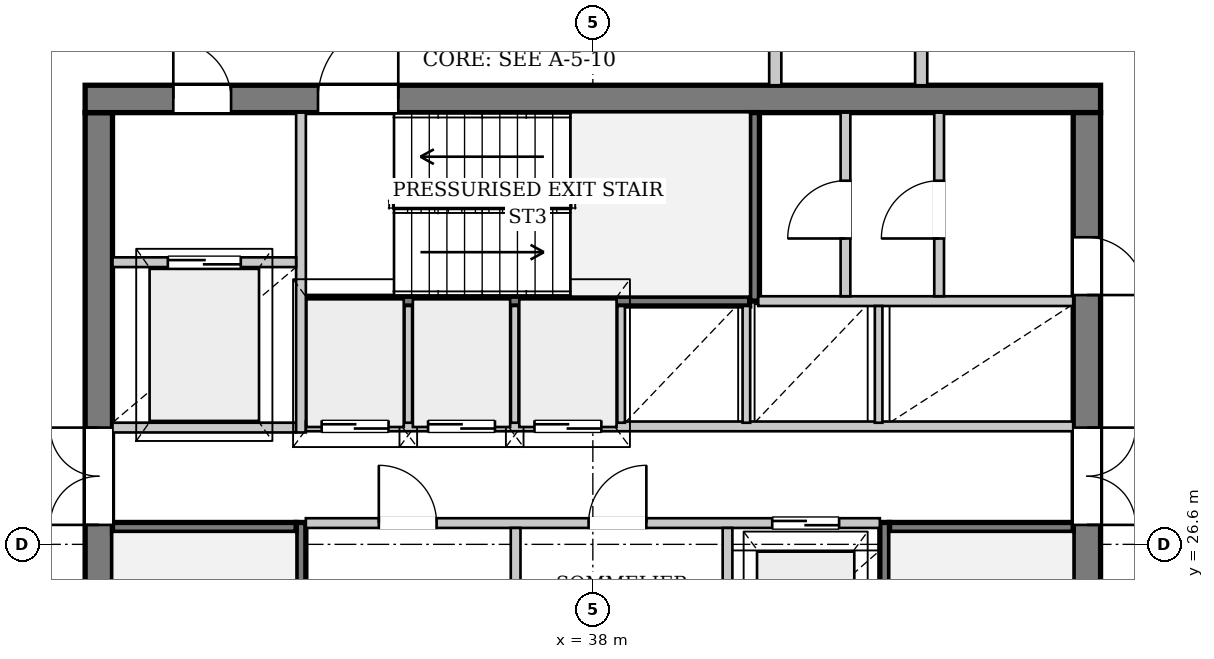
"""IFC4 building model, lengths in metres.
Left out: names, types, materials, properties, quantities, classifications, styles, units other than length and angle.
Written with IfcOpenShell. Run it as: python <this file> out.ifc"""

import sys

from ifc_helpers import new_model, si_unit, direction, frame, frame_2d, origin, place, context, subcontext, project, spatial, rectangle, extrude, source, transform, mapped, element, fill, save


model = new_model("IFC4")
c1 = context("Model", 3, precision=1e-05, world=origin(), true_north=direction((0.0, 1.0)))
c2 = subcontext(c1, "Body", "Model", "MODEL_VIEW")
j1 = project(units=[si_unit("LENGTHUNIT", "METRE"), si_unit("PLANEANGLEUNIT", "RADIAN")], contexts=[c1])
p1 = place(None, origin())
s1 = spatial("IfcSite", under=j1, at=p1, CompositionType="ELEMENT")
p2 = place(p1, origin())
s2 = spatial("IfcBuilding", under=s1, at=p2, CompositionType="ELEMENT")
p3 = place(p2, frame((0.0, 0.0, 266.9)))
s3 = spatial("IfcBuildingStorey", under=s2, at=p3, CompositionType="ELEMENT", Elevation=266.9)
p4 = place(p3, frame((51.43, 27.055, 0.0), z_axis=(0.0, 0.0, 1.0), x_axis=(-0.235712431361, -0.97182284893, 0.0)))
e1 = element("IfcWall", 1, at=p4, inside=s3, PredefinedType="SOLIDWALL", context=c2, shape_type="SweptSolid", body=[
    extrude(rectangle(XDim=22.254, YDim=0.32, at=frame_2d((11.127, 0.0))), origin(), (0.0, 0.0, 1.0), 2.872),
])
p5 = place(p4, frame((6.371, 0.0, 0.0)))
e2 = element("IfcOpeningElement", 2, at=p5, cuts=e1, PredefinedType="OPENING", context=c2, shape_type="SweptSolid", body=[
    extrude(rectangle(XDim=1.5, YDim=2.3, at=frame_2d((0.75, 1.15))), frame((0.0, 0.17, 0.0), z_axis=(0.0, -1.0, 0.0), x_axis=(1.0, 0.0, 0.0)), (0.0, 0.0, 1.0), 0.34),
])
p6 = place(p4, frame((15.168, 0.0, 0.402)))
e3 = element("IfcOpeningElement", 3, at=p6, cuts=e1, PredefinedType="OPENING", context=c2, shape_type="SweptSolid", body=[
    extrude(rectangle(XDim=2.6, YDim=2.35, at=frame_2d((1.3, 1.175))), frame((0.0, 0.17, 0.0), z_axis=(0.0, -1.0, 0.0), x_axis=(1.0, 0.0, 0.0)), (0.0, 0.0, 1.0), 0.34),
])
p7 = place(p3, frame((15.976, 26.276, 0.0), z_axis=(0.0, 0.0, 1.0), x_axis=(0.794029694054, 0.607878972297, 0.0)))
e4 = element("IfcWall", 4, at=p7, inside=s3, PredefinedType="SOLIDWALL", context=c2, shape_type="SweptSolid", body=[
    extrude(rectangle(XDim=21.739, YDim=0.38, at=frame_2d((10.869, 0.0))), origin(), (0.0, 0.0, 1.0), 2.872),
])
p8 = place(p7, frame((7.187, 0.0, 0.502)))
e5 = element("IfcOpeningElement", 5, at=p8, cuts=e4, PredefinedType="OPENING", context=c2, shape_type="SweptSolid", body=[
    extrude(rectangle(XDim=2.2, YDim=2.25, at=frame_2d((1.1, 1.125))), frame((0.0, 0.2, 0.0), z_axis=(0.0, -1.0, 0.0), x_axis=(1.0, 0.0, 0.0)), (0.0, 0.0, 1.0), 0.4),
])
p9 = place(p7, frame((16.752, 0.0, 0.502)))
e6 = element("IfcOpeningElement", 6, at=p9, cuts=e4, PredefinedType="OPENING", context=c2, shape_type="SweptSolid", body=[
    extrude(rectangle(XDim=2.2, YDim=2.25, at=frame_2d((1.1, 1.125))), frame((0.0, 0.2, 0.0), z_axis=(0.0, -1.0, 0.0), x_axis=(1.0, 0.0, 0.0)), (0.0, 0.0, 1.0), 0.4),
])
p10 = place(p3, frame((29.875, 19.5, 0.0), z_axis=(0.0, 0.0, 1.0), x_axis=(0.0, 1.0, 0.0)))
e7 = element("IfcWall", 7, at=p10, inside=s3, PredefinedType="SHEAR", context=c2, shape_type="SweptSolid", body=[
    extrude(rectangle(XDim=14.2, YDim=0.45, at=frame_2d((7.1, 0.0))), origin(), (0.0, 0.0, 1.0), 3.38),
])
p11 = place(p10, frame((7.42, 0.0, 0.0)))
e8 = element("IfcOpeningElement", 8, at=p11, cuts=e7, PredefinedType="OPENING", context=c2, shape_type="SweptSolid", body=[
    extrude(rectangle(XDim=1.6, YDim=2.2, at=frame_2d((0.8, 1.1))), frame((0.0, 0.235, 0.0), z_axis=(0.0, -1.0, 0.0), x_axis=(1.0, 0.0, 0.0)), (0.0, 0.0, 1.0), 0.47),
])
p12 = place(p3, frame((29.65, 33.925, 0.0), z_axis=(0.0, 0.0, 1.0), x_axis=(1.0, 0.0, 0.0)))
e9 = element("IfcWall", 9, at=p12, inside=s3, PredefinedType="SHEAR", context=c2, shape_type="SweptSolid", body=[
    extrude(rectangle(XDim=16.7, YDim=0.45, at=frame_2d((8.35, 0.0))), origin(), (0.0, 0.0, 1.0), 3.38),
])
p13 = place(p12, frame((1.45, 0.0, 0.0)))
e10 = element("IfcOpeningElement", 10, at=p13, cuts=e9, PredefinedType="OPENING", context=c2, shape_type="SweptSolid", body=[
    extrude(rectangle(XDim=0.95, YDim=2.1, at=frame_2d((0.475, 1.05))), frame((0.0, 0.235, 0.0), z_axis=(0.0, -1.0, 0.0), x_axis=(1.0, 0.0, 0.0)), (0.0, 0.0, 1.0), 0.47),
])
p14 = place(p12, frame((3.83, 0.0, 0.0)))
e11 = element("IfcOpeningElement", 11, at=p14, cuts=e9, PredefinedType="OPENING", context=c2, shape_type="SweptSolid", body=[
    extrude(rectangle(XDim=1.32, YDim=2.2, at=frame_2d((0.66, 1.1))), frame((0.0, 0.235, 0.0), z_axis=(0.0, -1.0, 0.0), x_axis=(1.0, 0.0, 0.0)), (0.0, 0.0, 1.0), 0.47),
])
p15 = place(p3, frame((46.125, 33.7, 0.0), z_axis=(0.0, 0.0, 1.0), x_axis=(0.0, -1.0, 0.0)))
e12 = element("IfcWall", 12, at=p15, inside=s3, PredefinedType="SHEAR", context=c2, shape_type="SweptSolid", body=[
    extrude(rectangle(XDim=14.2, YDim=0.45, at=frame_2d((7.1, 0.0))), origin(), (0.0, 0.0, 1.0), 3.38),
])
p16 = place(p15, frame((5.18, 0.0, 0.0)))
e13 = element("IfcOpeningElement", 13, at=p16, cuts=e12, PredefinedType="OPENING", context=c2, shape_type="SweptSolid", body=[
    extrude(rectangle(XDim=1.6, YDim=2.2, at=frame_2d((0.8, 1.1))), frame((0.0, 0.235, 0.0), z_axis=(0.0, -1.0, 0.0), x_axis=(1.0, 0.0, 0.0)), (0.0, 0.0, 1.0), 0.47),
])
p17 = place(p15, frame((2.05, 0.0, 0.0)))
e14 = element("IfcOpeningElement", 14, at=p17, cuts=e12, PredefinedType="OPENING", context=c2, shape_type="SweptSolid", body=[
    extrude(rectangle(XDim=0.95, YDim=2.1, at=frame_2d((0.475, 1.05))), frame((0.0, 0.235, 0.0), z_axis=(0.0, -1.0, 0.0), x_axis=(1.0, 0.0, 0.0)), (0.0, 0.0, 1.0), 0.47),
])
p18 = place(p3, frame((33.2, 19.5, 0.0), z_axis=(0.0, 0.0, 1.0), x_axis=(0.0, 1.0, 0.0)))
e15 = element("IfcWall", 15, at=p18, inside=s3, PredefinedType="PARTITIONING", context=c2, shape_type="SweptSolid", body=[
    extrude(rectangle(XDim=7.46, YDim=0.16, at=frame_2d((3.73, 0.0))), origin(), (0.0, 0.0, 1.0), 3.38),
])
p19 = place(p18, frame((0.08, 0.0, 0.0)))
e16 = element("IfcOpeningElement", 16, at=p19, cuts=e15, PredefinedType="OPENING", context=c2, shape_type="SweptSolid", body=[
    extrude(rectangle(XDim=1.32, YDim=2.2, at=frame_2d((0.66, 1.1))), frame((0.0, 0.09, 0.0), z_axis=(0.0, -1.0, 0.0), x_axis=(1.0, 0.0, 0.0)), (0.0, 0.0, 1.0), 0.18),
])
p20 = place(p3, frame((30.1, 26.88, 0.0), z_axis=(0.0, 0.0, 1.0), x_axis=(1.0, 0.0, 0.0)))
e17 = element("IfcWall", 17, at=p20, inside=s3, PredefinedType="PARTITIONING", context=c2, shape_type="SweptSolid", body=[
    extrude(rectangle(XDim=3.02, YDim=0.16, at=frame_2d((1.51, 0.0))), origin(), (0.0, 0.0, 1.0), 3.38),
])
p21 = place(p3, frame((42.8, 26.96, 0.0), z_axis=(0.0, 0.0, 1.0), x_axis=(0.0, -1.0, 0.0)))
e18 = element("IfcWall", 18, at=p21, inside=s3, PredefinedType="PARTITIONING", context=c2, shape_type="SweptSolid", body=[
    extrude(rectangle(XDim=7.46, YDim=0.16, at=frame_2d((3.73, 0.0))), origin(), (0.0, 0.0, 1.0), 3.38),
])
p22 = place(p21, frame((6.06, 0.0, 0.0)))
e19 = element("IfcOpeningElement", 19, at=p22, cuts=e18, PredefinedType="OPENING", context=c2, shape_type="SweptSolid", body=[
    extrude(rectangle(XDim=1.32, YDim=2.2, at=frame_2d((0.66, 1.1))), frame((0.0, 0.09, 0.0), z_axis=(0.0, -1.0, 0.0), x_axis=(1.0, 0.0, 0.0)), (0.0, 0.0, 1.0), 0.18),
])
p23 = place(p3, frame((42.88, 26.88, 0.0), z_axis=(0.0, 0.0, 1.0), x_axis=(1.0, 0.0, 0.0)))
e20 = element("IfcWall", 20, at=p23, inside=s3, PredefinedType="PARTITIONING", context=c2, shape_type="SweptSolid", body=[
    extrude(rectangle(XDim=3.02, YDim=0.16, at=frame_2d((1.51, 0.0))), origin(), (0.0, 0.0, 1.0), 3.38),
])
p24 = place(p3, frame((33.28, 30.6, 0.0), z_axis=(0.0, 0.0, 1.0), x_axis=(1.0, 0.0, 0.0)))
e21 = element("IfcWall", 21, at=p24, inside=s3, PredefinedType="PARTITIONING", context=c2, shape_type="SweptSolid", body=[
    extrude(rectangle(XDim=7.3, YDim=0.16, at=frame_2d((3.65, 0.0))), origin(), (0.0, 0.0, 1.0), 3.38),
])
p25 = place(p3, frame((40.66, 30.6, 0.0), z_axis=(0.0, 0.0, 1.0), x_axis=(0.0, 1.0, 0.0)))
e22 = element("IfcWall", 22, at=p25, inside=s3, PredefinedType="PARTITIONING", context=c2, shape_type="SweptSolid", body=[
    extrude(rectangle(XDim=3.1, YDim=0.16, at=frame_2d((1.55, 0.0))), origin(), (0.0, 0.0, 1.0), 3.38),
])
p26 = place(p3, frame((30.1, 28.52, 0.0), z_axis=(0.0, 0.0, 1.0), x_axis=(1.0, 0.0, 0.0)))
e23 = element("IfcWall", 23, at=p26, inside=s3, PredefinedType="PARTITIONING", context=c2, shape_type="SweptSolid", body=[
    extrude(rectangle(XDim=3.02, YDim=0.16, at=frame_2d((1.51, 0.0))), origin(), (0.0, 0.0, 1.0), 3.38),
])
p27 = place(p3, frame((33.2, 28.44, 0.0), z_axis=(0.0, 0.0, 1.0), x_axis=(0.0, 1.0, 0.0)))
e24 = element("IfcWall", 24, at=p27, inside=s3, PredefinedType="PARTITIONING", context=c2, shape_type="SweptSolid", body=[
    extrude(rectangle(XDim=5.26, YDim=0.16, at=frame_2d((2.63, 0.0))), origin(), (0.0, 0.0, 1.0), 3.38),
])
p28 = place(p3, frame((30.1, 31.24, 0.0), z_axis=(0.0, 0.0, 1.0), x_axis=(1.0, 0.0, 0.0)))
e25 = element("IfcWall", 25, at=p28, inside=s3, PredefinedType="PARTITIONING", context=c2, shape_type="SweptSolid", body=[
    extrude(rectangle(XDim=3.02, YDim=0.16, at=frame_2d((1.51, 0.0))), origin(), (0.0, 0.0, 1.0), 3.38),
])
p29 = place(p28, frame((0.91, 0.0, 0.0)))
e26 = element("IfcOpeningElement", 26, at=p29, cuts=e25, PredefinedType="OPENING", context=c2, shape_type="SweptSolid", body=[
    extrude(rectangle(XDim=1.2, YDim=2.2, at=frame_2d((0.6, 1.1))), frame((0.0, 0.09, 0.0), z_axis=(0.0, -1.0, 0.0), x_axis=(1.0, 0.0, 0.0)), (0.0, 0.0, 1.0), 0.18),
])
p30 = place(p3, frame((33.28, 26.95, 0.0), z_axis=(0.0, 0.0, 1.0), x_axis=(1.0, 0.0, 0.0)))
e27 = element("IfcWall", 27, at=p30, inside=s3, PredefinedType="PARTITIONING", context=c2, shape_type="SweptSolid", body=[
    extrude(rectangle(XDim=9.44, YDim=0.16, at=frame_2d((4.72, 0.0))), origin(), (0.0, 0.0, 1.0), 3.38),
])
p31 = place(p30, frame((1.2, 0.0, 0.0)))
e28 = element("IfcOpeningElement", 28, at=p31, cuts=e27, PredefinedType="OPENING", context=c2, shape_type="SweptSolid", body=[
    extrude(rectangle(XDim=0.95, YDim=2.1, at=frame_2d((0.475, 1.05))), frame((0.0, 0.09, 0.0), z_axis=(0.0, -1.0, 0.0), x_axis=(1.0, 0.0, 0.0)), (0.0, 0.0, 1.0), 0.18),
])
p32 = place(p30, frame((4.65, 0.0, 0.0)))
e29 = element("IfcOpeningElement", 29, at=p32, cuts=e27, PredefinedType="OPENING", context=c2, shape_type="SweptSolid", body=[
    extrude(rectangle(XDim=0.95, YDim=2.1, at=frame_2d((0.475, 1.05))), frame((0.0, 0.09, 0.0), z_axis=(0.0, -1.0, 0.0), x_axis=(1.0, 0.0, 0.0)), (0.0, 0.0, 1.0), 0.18),
])
p33 = place(p30, frame((7.67, 0.0, 0.0)))
e30 = element("IfcOpeningElement", 30, at=p33, cuts=e27, PredefinedType="OPENING", context=c2, shape_type="SweptSolid", body=[
    extrude(rectangle(XDim=1.1, YDim=2.2, at=frame_2d((0.55, 1.1))), frame((0.0, 0.09, 0.0), z_axis=(0.0, -1.0, 0.0), x_axis=(1.0, 0.0, 0.0)), (0.0, 0.0, 1.0), 0.18),
])
for number, where, z_axis, x_axis in (
    (31, (36.73, 24.56, 0.0), (0.0, 0.0, 1.0), (0.0, 1.0, 0.0)),
    (32, (40.215, 24.56, 0.0), (0.0, 0.0, 1.0), (0.0, 1.0, 0.0)),
):
    element("IfcWall", number, at=place(p3, frame(where, z_axis=z_axis, x_axis=x_axis)), inside=s3, PredefinedType="PARTITIONING", context=c2, shape_type="SweptSolid", body=[
        extrude(rectangle(XDim=2.31, YDim=0.16, at=frame_2d((1.155, 0.0))), origin(), (0.0, 0.0, 1.0), 3.38),
    ])
p34 = place(p3, frame((33.28, 28.54, 0.0), z_axis=(0.0, 0.0, 1.0), x_axis=(1.0, 0.0, 0.0)))
e33 = element("IfcWall", 33, at=p34, inside=s3, PredefinedType="PARTITIONING", context=c2, shape_type="SweptSolid", body=[
    extrude(rectangle(XDim=12.62, YDim=0.16, at=frame_2d((6.31, 0.0))), origin(), (0.0, 0.0, 1.0), 3.38),
])
p35 = place(p34, frame((0.26, 0.0, 0.0)))
e34 = element("IfcOpeningElement", 34, at=p35, cuts=e33, PredefinedType="OPENING", context=c2, shape_type="SweptSolid", body=[
    extrude(rectangle(XDim=1.1, YDim=2.2, at=frame_2d((0.55, 1.1))), frame((0.0, 0.09, 0.0), z_axis=(0.0, -1.0, 0.0), x_axis=(1.0, 0.0, 0.0)), (0.0, 0.0, 1.0), 0.18),
])
p36 = place(p34, frame((2.01, 0.0, 0.0)))
e35 = element("IfcOpeningElement", 35, at=p36, cuts=e33, PredefinedType="OPENING", context=c2, shape_type="SweptSolid", body=[
    extrude(rectangle(XDim=1.1, YDim=2.2, at=frame_2d((0.55, 1.1))), frame((0.0, 0.09, 0.0), z_axis=(0.0, -1.0, 0.0), x_axis=(1.0, 0.0, 0.0)), (0.0, 0.0, 1.0), 0.18),
])
p37 = place(p34, frame((3.76, 0.0, 0.0)))
e36 = element("IfcOpeningElement", 36, at=p37, cuts=e33, PredefinedType="OPENING", context=c2, shape_type="SweptSolid", body=[
    extrude(rectangle(XDim=1.1, YDim=2.2, at=frame_2d((0.55, 1.1))), frame((0.0, 0.09, 0.0), z_axis=(0.0, -1.0, 0.0), x_axis=(1.0, 0.0, 0.0)), (0.0, 0.0, 1.0), 0.18),
])
p38 = place(p3, frame((40.72, 30.6, 0.0), z_axis=(0.0, 0.0, 1.0), x_axis=(1.0, 0.0, 0.0)))
e37 = element("IfcWall", 37, at=p38, inside=s3, PredefinedType="PARTITIONING", context=c2, shape_type="SweptSolid", body=[
    extrude(rectangle(XDim=5.18, YDim=0.16, at=frame_2d((2.59, 0.0))), origin(), (0.0, 0.0, 1.0), 3.38),
])
for number, where, z_axis, x_axis in (
    (38, (34.965, 28.6, 0.0), (0.0, 0.0, 1.0), (0.0, 1.0, 0.0)),
    (39, (36.715, 28.6, 0.0), (0.0, 0.0, 1.0), (0.0, 1.0, 0.0)),
    (40, (38.465, 28.6, 0.0), (0.0, 0.0, 1.0), (0.0, 1.0, 0.0)),
    (41, (40.525, 28.6, 0.0), (0.0, 0.0, 1.0), (0.0, 1.0, 0.0)),
    (42, (42.7, 28.6, 0.0), (0.0, 0.0, 1.0), (0.0, 1.0, 0.0)),
):
    element("IfcWall", number, at=place(p3, frame(where, z_axis=z_axis, x_axis=x_axis)), inside=s3, PredefinedType="PARTITIONING", context=c2, shape_type="SweptSolid", body=[
        extrude(rectangle(XDim=1.92, YDim=0.125, at=frame_2d((0.96, 0.0))), origin(), (0.0, 0.0, 1.0), 3.38),
    ])
p39 = place(p3, frame((42.155, 30.68, 0.0), z_axis=(0.0, 0.0, 1.0), x_axis=(0.0, 1.0, 0.0)))
e43 = element("IfcWall", 43, at=p39, inside=s3, PredefinedType="PARTITIONING", context=c2, shape_type="SweptSolid", body=[
    extrude(rectangle(XDim=3.02, YDim=0.16, at=frame_2d((1.51, 0.0))), origin(), (0.0, 0.0, 1.0), 3.38),
])
p40 = place(p39, frame((0.95, 0.0, 0.0)))
e44 = element("IfcOpeningElement", 44, at=p40, cuts=e43, PredefinedType="OPENING", context=c2, shape_type="SweptSolid", body=[
    extrude(rectangle(XDim=0.95, YDim=2.1, at=frame_2d((0.475, 1.05))), frame((0.0, 0.09, 0.0), z_axis=(0.0, -1.0, 0.0), x_axis=(1.0, 0.0, 0.0)), (0.0, 0.0, 1.0), 0.18),
])
p41 = place(p3, frame((43.695, 30.68, 0.0), z_axis=(0.0, 0.0, 1.0), x_axis=(0.0, 1.0, 0.0)))
e45 = element("IfcWall", 45, at=p41, inside=s3, PredefinedType="PARTITIONING", context=c2, shape_type="SweptSolid", body=[
    extrude(rectangle(XDim=3.02, YDim=0.16, at=frame_2d((1.51, 0.0))), origin(), (0.0, 0.0, 1.0), 3.38),
])
p42 = place(p41, frame((0.95, 0.0, 0.0)))
e46 = element("IfcOpeningElement", 46, at=p42, cuts=e45, PredefinedType="OPENING", context=c2, shape_type="SweptSolid", body=[
    extrude(rectangle(XDim=0.95, YDim=2.1, at=frame_2d((0.475, 1.05))), frame((0.0, 0.09, 0.0), z_axis=(0.0, -1.0, 0.0), x_axis=(1.0, 0.0, 0.0)), (0.0, 0.0, 1.0), 0.18),
])
p43 = place(p3, frame((41.0, 34.15, 0.0), z_axis=(0.0, 0.0, 1.0), x_axis=(0.0, 1.0, 0.0)))
e47 = element("IfcWall", 47, at=p43, inside=s3, PredefinedType="PARTITIONING", context=c2, shape_type="SweptSolid", body=[
    extrude(rectangle(XDim=1.85, YDim=0.2, at=frame_2d((0.925, 0.0))), origin(), (0.0, 0.0, 1.0), 3.38),
])
p44 = place(p3, frame((43.4, 34.15, 0.0), z_axis=(0.0, 0.0, 1.0), x_axis=(0.0, 1.0, 0.0)))
e48 = element("IfcWall", 48, at=p44, inside=s3, PredefinedType="PARTITIONING", context=c2, shape_type="SweptSolid", body=[
    extrude(rectangle(XDim=1.85, YDim=0.2, at=frame_2d((0.925, 0.0))), origin(), (0.0, 0.0, 1.0), 3.055),
])
m1 = source(origin(), c2, "Body", "SweptSolid", [
    extrude(rectangle(XDim=1.6, YDim=2.2, at=frame_2d((0.8, 1.1))), frame((0.0, 0.025, 0.0), z_axis=(0.0, -1.0, 0.0), x_axis=(1.0, 0.0, 0.0)), (0.0, 0.0, 1.0), 0.05),
])
p45 = place(p11, origin())
e49 = element("IfcDoor", 49, at=p45, inside=s3, OperationType="DOUBLE_DOOR_SINGLE_SWING", PredefinedType="DOOR", context=c2, shape_type="MappedRepresentation", body=[
    mapped(m1, transform((0.0, 0.0, 0.0), x_axis=(1.0, 0.0, 0.0), y_axis=(0.0, 1.0, 0.0), z_axis=(0.0, 0.0, 1.0), scale=1.0)),
])
fill(e8, e49)
m2 = source(origin(), c2, "Body", "SweptSolid", [
    extrude(rectangle(XDim=0.95, YDim=2.1, at=frame_2d((0.475, 1.05))), frame((0.0, 0.025, 0.0), z_axis=(0.0, -1.0, 0.0), x_axis=(1.0, 0.0, 0.0)), (0.0, 0.0, 1.0), 0.05),
])
p46 = place(p13, origin())
e50 = element("IfcDoor", 50, at=p46, inside=s3, OperationType="SINGLE_SWING_LEFT", PredefinedType="DOOR", context=c2, shape_type="MappedRepresentation", body=[
    mapped(m2, transform((0.0, 0.0, 0.0), x_axis=(1.0, 0.0, 0.0), y_axis=(0.0, 1.0, 0.0), z_axis=(0.0, 0.0, 1.0), scale=1.0)),
])
fill(e10, e50)
m3 = source(origin(), c2, "Body", "SweptSolid", [
    extrude(rectangle(XDim=1.32, YDim=2.2, at=frame_2d((0.66, 1.1))), frame((0.0, 0.025, 0.0), z_axis=(0.0, -1.0, 0.0), x_axis=(1.0, 0.0, 0.0)), (0.0, 0.0, 1.0), 0.05),
])
p47 = place(p14, origin())
e51 = element("IfcDoor", 51, at=p47, inside=s3, OperationType="SINGLE_SWING_RIGHT", PredefinedType="DOOR", context=c2, shape_type="MappedRepresentation", body=[
    mapped(m3, transform((0.0, 0.0, 0.0), x_axis=(1.0, 0.0, 0.0), y_axis=(0.0, 1.0, 0.0), z_axis=(0.0, 0.0, 1.0), scale=1.0)),
])
fill(e11, e51)
p48 = place(p16, origin())
e52 = element("IfcDoor", 52, at=p48, inside=s3, OperationType="DOUBLE_DOOR_SINGLE_SWING", PredefinedType="DOOR", context=c2, shape_type="MappedRepresentation", body=[
    mapped(m1, transform((0.0, 0.0, 0.0), x_axis=(1.0, 0.0, 0.0), y_axis=(0.0, 1.0, 0.0), z_axis=(0.0, 0.0, 1.0), scale=1.0)),
])
fill(e13, e52)
m4 = source(origin(), c2, "Body", "SweptSolid", [
    extrude(rectangle(XDim=1.2, YDim=2.2, at=frame_2d((0.6, 1.1))), frame((0.0, 0.025, 0.0), z_axis=(0.0, -1.0, 0.0), x_axis=(1.0, 0.0, 0.0)), (0.0, 0.0, 1.0), 0.05),
])
p49 = place(p29, origin())
e53 = element("IfcDoor", 53, at=p49, inside=s3, OperationType="DOUBLE_DOOR_SLIDING", PredefinedType="DOOR", context=c2, shape_type="MappedRepresentation", body=[
    mapped(m4, transform((0.0, 0.0, 0.0), x_axis=(1.0, 0.0, 0.0), y_axis=(0.0, 1.0, 0.0), z_axis=(0.0, 0.0, 1.0), scale=1.0)),
])
fill(e26, e53)
p50 = place(p31, origin())
e54 = element("IfcDoor", 54, at=p50, inside=s3, OperationType="SINGLE_SWING_LEFT", PredefinedType="DOOR", context=c2, shape_type="MappedRepresentation", body=[
    mapped(m2, transform((0.0, 0.0, 0.0), x_axis=(1.0, 0.0, 0.0), y_axis=(0.0, 1.0, 0.0), z_axis=(0.0, 0.0, 1.0), scale=1.0)),
])
fill(e28, e54)
p51 = place(p32, origin())
e55 = element("IfcDoor", 55, at=p51, inside=s3, OperationType="SINGLE_SWING_RIGHT", PredefinedType="DOOR", context=c2, shape_type="MappedRepresentation", body=[
    mapped(m2, transform((0.0, 0.0, 0.0), x_axis=(1.0, 0.0, 0.0), y_axis=(0.0, 1.0, 0.0), z_axis=(0.0, 0.0, 1.0), scale=1.0)),
])
fill(e29, e55)
m5 = source(origin(), c2, "Body", "SweptSolid", [
    extrude(rectangle(XDim=1.1, YDim=2.2, at=frame_2d((0.55, 1.1))), frame((0.0, 0.025, 0.0), z_axis=(0.0, -1.0, 0.0), x_axis=(1.0, 0.0, 0.0)), (0.0, 0.0, 1.0), 0.05),
])
p52 = place(p33, origin())
e56 = element("IfcDoor", 56, at=p52, inside=s3, OperationType="DOUBLE_DOOR_SLIDING", PredefinedType="DOOR", context=c2, shape_type="MappedRepresentation", body=[
    mapped(m5, transform((0.0, 0.0, 0.0), x_axis=(1.0, 0.0, 0.0), y_axis=(0.0, 1.0, 0.0), z_axis=(0.0, 0.0, 1.0), scale=1.0)),
])
fill(e30, e56)
p53 = place(p35, origin())
e57 = element("IfcDoor", 57, at=p53, inside=s3, OperationType="DOUBLE_DOOR_SLIDING", PredefinedType="DOOR", context=c2, shape_type="MappedRepresentation", body=[
    mapped(m5, transform((0.0, 0.0, 0.0), x_axis=(1.0, 0.0, 0.0), y_axis=(0.0, 1.0, 0.0), z_axis=(0.0, 0.0, 1.0), scale=1.0)),
])
fill(e34, e57)
p54 = place(p36, origin())
e58 = element("IfcDoor", 58, at=p54, inside=s3, OperationType="DOUBLE_DOOR_SLIDING", PredefinedType="DOOR", context=c2, shape_type="MappedRepresentation", body=[
    mapped(m5, transform((0.0, 0.0, 0.0), x_axis=(1.0, 0.0, 0.0), y_axis=(0.0, 1.0, 0.0), z_axis=(0.0, 0.0, 1.0), scale=1.0)),
])
fill(e35, e58)
p55 = place(p37, origin())
e59 = element("IfcDoor", 59, at=p55, inside=s3, OperationType="DOUBLE_DOOR_SLIDING", PredefinedType="DOOR", context=c2, shape_type="MappedRepresentation", body=[
    mapped(m5, transform((0.0, 0.0, 0.0), x_axis=(1.0, 0.0, 0.0), y_axis=(0.0, 1.0, 0.0), z_axis=(0.0, 0.0, 1.0), scale=1.0)),
])
fill(e36, e59)
p56 = place(p40, origin())
e60 = element("IfcDoor", 60, at=p56, inside=s3, OperationType="SINGLE_SWING_LEFT", PredefinedType="DOOR", context=c2, shape_type="MappedRepresentation", body=[
    mapped(m2, transform((0.0, 0.0, 0.0), x_axis=(1.0, 0.0, 0.0), y_axis=(0.0, 1.0, 0.0), z_axis=(0.0, 0.0, 1.0), scale=1.0)),
])
fill(e44, e60)
p57 = place(p42, origin())
e61 = element("IfcDoor", 61, at=p57, inside=s3, OperationType="SINGLE_SWING_LEFT", PredefinedType="DOOR", context=c2, shape_type="MappedRepresentation", body=[
    mapped(m2, transform((0.0, 0.0, 0.0), x_axis=(1.0, 0.0, 0.0), y_axis=(0.0, 1.0, 0.0), z_axis=(0.0, 0.0, 1.0), scale=1.0)),
])
fill(e46, e61)
p58 = place(p17, origin())
e62 = element("IfcDoor", 62, at=p58, inside=s3, OperationType="SINGLE_SWING_RIGHT", PredefinedType="DOOR", context=c2, shape_type="MappedRepresentation", body=[
    mapped(m2, transform((0.0, 0.0, 0.0), x_axis=(1.0, 0.0, 0.0), y_axis=(0.0, 1.0, 0.0), z_axis=(0.0, 0.0, 1.0), scale=1.0)),
])
fill(e14, e62)
save(model, sys.argv[1])
